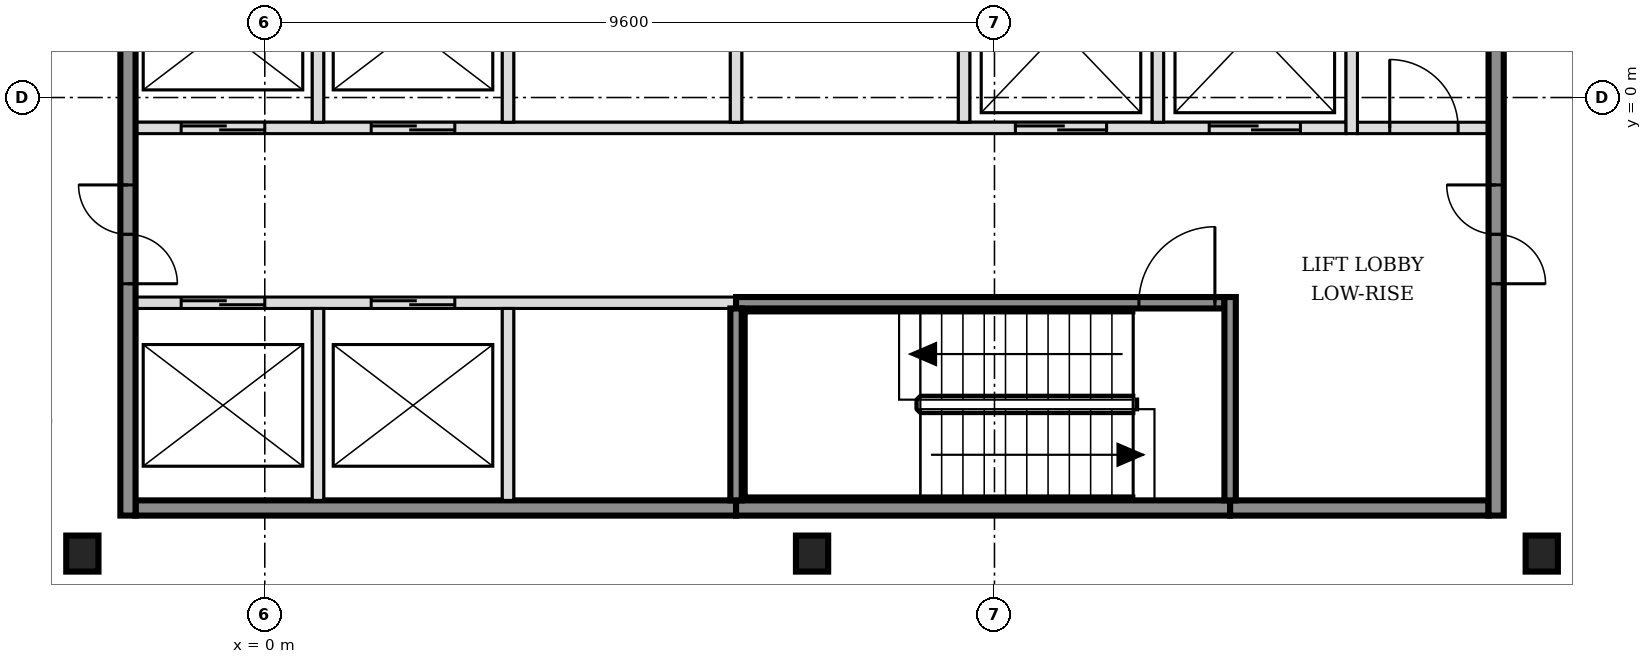
"""IFC4 building model, lengths in metres.
Left out: names, types, materials, properties, quantities, classifications, styles, units other than length and angle.
Written with IfcOpenShell. Run it as: python <this file> out.ifc"""

import sys

from ifc_helpers import new_model, si_unit, direction, frame, frame_2d, origin, origin_2d, place, context, subcontext, project, spatial, rectangle, i_section, extrude, element, fill, save


model = new_model("IFC4")
c1 = context("Model", 3, precision=1e-05, world=origin(), true_north=direction((0.0, 1.0)))
c2 = subcontext(c1, "Body", "Model", "MODEL_VIEW")
j1 = project(units=[si_unit("LENGTHUNIT", "METRE"), si_unit("PLANEANGLEUNIT", "RADIAN")], contexts=[c1])
p1 = place(None, origin())
s1 = spatial("IfcSite", under=j1, at=p1, CompositionType="ELEMENT")
p2 = place(p1, origin())
s2 = spatial("IfcBuilding", under=s1, at=p2, CompositionType="ELEMENT")
p3 = place(p2, frame((0.0, 0.0, 108.6)))
s3 = spatial("IfcBuildingStorey", under=s2, at=p3, CompositionType="ELEMENT", Elevation=108.6)
for number, where, z_axis, x_axis in (
    (1, (-2.4, -6.0, -0.15), (0.0, 0.0, 1.0), (1.0, 0.0, 0.0)),
    (2, (7.2, -6.0, -0.15), (0.0, 0.0, 1.0), (1.0, 0.0, 0.0)),
    (3, (16.8, -6.0, -0.15), (0.0, 0.0, 1.0), (1.0, 0.0, 0.0)),
):
    element("IfcColumn", number, at=place(p3, frame(where, z_axis=z_axis, x_axis=x_axis)), inside=s3, PredefinedType="COLUMN", context=c2, shape_type="SweptSolid", body=[
        extrude(i_section(OverallWidth=0.424, OverallDepth=0.474, WebThickness=0.048, FlangeThickness=0.077, FilletRadius=0.015, at=origin_2d()), origin(), (0.0, 0.0, 1.0), 3.6),
    ])
p4 = place(p3, frame((-1.7, -5.4, 0.0), z_axis=(0.0, 0.0, 1.0), x_axis=(1.0, 0.0, 0.0)))
e4 = element("IfcWall", 4, at=p4, inside=s3, PredefinedType="SOLIDWALL", context=c2, shape_type="SweptSolid", body=[
    extrude(rectangle(XDim=7.9, YDim=0.2, at=frame_2d((3.95, 0.0))), origin(), (0.0, 0.0, 1.0), 3.45),
])
p5 = place(p3, frame((6.2, -5.4, 0.0), z_axis=(0.0, 0.0, 1.0), x_axis=(1.0, 0.0, 0.0)))
e5 = element("IfcWall", 5, at=p5, inside=s3, PredefinedType="SOLIDWALL", context=c2, shape_type="SweptSolid", body=[
    extrude(rectangle(XDim=6.5, YDim=0.2, at=frame_2d((3.25, 0.0))), origin(), (0.0, 0.0, 1.0), 3.45),
])
p6 = place(p3, frame((12.7, -5.4, 0.0), z_axis=(0.0, 0.0, 1.0), x_axis=(1.0, 0.0, 0.0)))
e6 = element("IfcWall", 6, at=p6, inside=s3, PredefinedType="SOLIDWALL", context=c2, shape_type="SweptSolid", body=[
    extrude(rectangle(XDim=3.4, YDim=0.2, at=frame_2d((1.7, 0.0))), origin(), (0.0, 0.0, 1.0), 3.45),
])
p7 = place(p3, frame((-1.7, -2.7, 0.0), z_axis=(0.0, 0.0, 1.0), x_axis=(1.0, 0.0, 0.0)))
e7 = element("IfcWall", 7, at=p7, inside=s3, PredefinedType="SOLIDWALL", context=c2, shape_type="SweptSolid", body=[
    extrude(rectangle(XDim=7.9, YDim=0.15, at=frame_2d((3.95, 0.0))), origin(), (0.0, 0.0, 1.0), 3.45),
])
p8 = place(p7, frame((0.6, 0.0, 0.0)))
e8 = element("IfcOpeningElement", 8, at=p8, cuts=e7, PredefinedType="OPENING", context=c2, shape_type="SweptSolid", body=[
    extrude(rectangle(XDim=1.1, YDim=2.1, at=frame_2d((0.55, 1.05))), frame((0.0, 0.085, 0.0), z_axis=(0.0, -1.0, 0.0), x_axis=(1.0, 0.0, 0.0)), (0.0, 0.0, 1.0), 0.17),
])
p9 = place(p7, frame((3.1, 0.0, 0.0)))
e9 = element("IfcOpeningElement", 9, at=p9, cuts=e7, PredefinedType="OPENING", context=c2, shape_type="SweptSolid", body=[
    extrude(rectangle(XDim=1.1, YDim=2.1, at=frame_2d((0.55, 1.05))), frame((0.0, 0.085, 0.0), z_axis=(0.0, -1.0, 0.0), x_axis=(1.0, 0.0, 0.0)), (0.0, 0.0, 1.0), 0.17),
])
p10 = place(p3, frame((6.2, -2.7, 0.0), z_axis=(0.0, 0.0, 1.0), x_axis=(1.0, 0.0, 0.0)))
e10 = element("IfcWall", 10, at=p10, inside=s3, PredefinedType="SOLIDWALL", context=c2, shape_type="SweptSolid", body=[
    extrude(rectangle(XDim=6.425, YDim=0.15, at=frame_2d((3.212, 0.0))), origin(), (0.0, 0.0, 1.0), 3.45),
])
p11 = place(p10, frame((5.3, 0.0, 0.0)))
e11 = element("IfcOpeningElement", 11, at=p11, cuts=e10, PredefinedType="OPENING", context=c2, shape_type="SweptSolid", body=[
    extrude(rectangle(XDim=1.0, YDim=2.1, at=frame_2d((0.5, 1.05))), frame((0.0, 0.085, 0.0), z_axis=(0.0, -1.0, 0.0), x_axis=(1.0, 0.0, 0.0)), (0.0, 0.0, 1.0), 0.17),
])
p12 = place(p3, frame((-1.7, -0.4, 0.0), z_axis=(0.0, 0.0, 1.0), x_axis=(1.0, 0.0, 0.0)))
e12 = element("IfcWall", 12, at=p12, inside=s3, PredefinedType="SOLIDWALL", context=c2, shape_type="SweptSolid", body=[
    extrude(rectangle(XDim=15.925, YDim=0.15, at=frame_2d((7.962, 0.0))), origin(), (0.0, 0.0, 1.0), 3.45),
])
p13 = place(p12, frame((0.6, 0.0, 0.0)))
e13 = element("IfcOpeningElement", 13, at=p13, cuts=e12, PredefinedType="OPENING", context=c2, shape_type="SweptSolid", body=[
    extrude(rectangle(XDim=1.1, YDim=2.1, at=frame_2d((0.55, 1.05))), frame((0.0, 0.085, 0.0), z_axis=(0.0, -1.0, 0.0), x_axis=(1.0, 0.0, 0.0)), (0.0, 0.0, 1.0), 0.17),
])
p14 = place(p12, frame((3.1, 0.0, 0.0)))
e14 = element("IfcOpeningElement", 14, at=p14, cuts=e12, PredefinedType="OPENING", context=c2, shape_type="SweptSolid", body=[
    extrude(rectangle(XDim=1.1, YDim=2.1, at=frame_2d((0.55, 1.05))), frame((0.0, 0.085, 0.0), z_axis=(0.0, -1.0, 0.0), x_axis=(1.0, 0.0, 0.0)), (0.0, 0.0, 1.0), 0.17),
])
p15 = place(p12, frame((11.575, 0.0, 0.0)))
e15 = element("IfcOpeningElement", 15, at=p15, cuts=e12, PredefinedType="OPENING", context=c2, shape_type="SweptSolid", body=[
    extrude(rectangle(XDim=1.2, YDim=2.1, at=frame_2d((0.6, 1.05))), frame((0.0, 0.085, 0.0), z_axis=(0.0, -1.0, 0.0), x_axis=(1.0, 0.0, 0.0)), (0.0, 0.0, 1.0), 0.17),
])
p16 = place(p12, frame((14.125, 0.0, 0.0)))
e16 = element("IfcOpeningElement", 16, at=p16, cuts=e12, PredefinedType="OPENING", context=c2, shape_type="SweptSolid", body=[
    extrude(rectangle(XDim=1.2, YDim=2.1, at=frame_2d((0.6, 1.05))), frame((0.0, 0.085, 0.0), z_axis=(0.0, -1.0, 0.0), x_axis=(1.0, 0.0, 0.0)), (0.0, 0.0, 1.0), 0.17),
])
p17 = place(p3, frame((14.375, -0.4, 0.0), z_axis=(0.0, 0.0, 1.0), x_axis=(1.0, 0.0, 0.0)))
e17 = element("IfcWall", 17, at=p17, inside=s3, PredefinedType="PARTITIONING", context=c2, shape_type="SweptSolid", body=[
    extrude(rectangle(XDim=1.725, YDim=0.15, at=frame_2d((0.863, 0.0))), origin(), (0.0, 0.0, 1.0), 3.45),
])
p18 = place(p17, frame((0.425, 0.0, 0.0)))
e18 = element("IfcOpeningElement", 18, at=p18, cuts=e17, PredefinedType="OPENING", context=c2, shape_type="SweptSolid", body=[
    extrude(rectangle(XDim=0.9, YDim=2.1, at=frame_2d((0.45, 1.05))), frame((0.0, 0.085, 0.0), z_axis=(0.0, -1.0, 0.0), x_axis=(1.0, 0.0, 0.0)), (0.0, 0.0, 1.0), 0.17),
])
p19 = place(p3, frame((-1.8, -5.5, 0.0), z_axis=(0.0, 0.0, 1.0), x_axis=(0.0, 1.0, 0.0)))
e19 = element("IfcWall", 19, at=p19, inside=s3, PredefinedType="SOLIDWALL", context=c2, shape_type="SweptSolid", body=[
    extrude(rectangle(XDim=15.8, YDim=0.2, at=frame_2d((7.9, 0.0))), origin(), (0.0, 0.0, 1.0), 3.45),
])
p20 = place(p19, frame((3.05, 0.0, 0.0)))
e20 = element("IfcOpeningElement", 20, at=p20, cuts=e19, PredefinedType="OPENING", context=c2, shape_type="SweptSolid", body=[
    extrude(rectangle(XDim=1.3, YDim=2.1, at=frame_2d((0.65, 1.05))), frame((0.0, 0.11, 0.0), z_axis=(0.0, -1.0, 0.0), x_axis=(1.0, 0.0, 0.0)), (0.0, 0.0, 1.0), 0.22),
])
p21 = place(p19, frame((11.45, 0.0, 0.0)))
e21 = element("IfcOpeningElement", 21, at=p21, cuts=e19, PredefinedType="OPENING", context=c2, shape_type="SweptSolid", body=[
    extrude(rectangle(XDim=1.3, YDim=2.1, at=frame_2d((0.65, 1.05))), frame((0.0, 0.11, 0.0), z_axis=(0.0, -1.0, 0.0), x_axis=(1.0, 0.0, 0.0)), (0.0, 0.0, 1.0), 0.22),
])
p22 = place(p3, frame((0.7, -5.3, 0.0), z_axis=(0.0, 0.0, 1.0), x_axis=(0.0, 1.0, 0.0)))
e22 = element("IfcWall", 22, at=p22, inside=s3, PredefinedType="SOLIDWALL", context=c2, shape_type="SweptSolid", body=[
    extrude(rectangle(XDim=2.525, YDim=0.15, at=frame_2d((1.263, 0.0))), origin(), (0.0, 0.0, 1.0), 3.45),
])
p23 = place(p3, frame((0.7, -0.325, 0.0), z_axis=(0.0, 0.0, 1.0), x_axis=(0.0, 1.0, 0.0)))
e23 = element("IfcWall", 23, at=p23, inside=s3, PredefinedType="SOLIDWALL", context=c2, shape_type="SweptSolid", body=[
    extrude(rectangle(XDim=2.45, YDim=0.15, at=frame_2d((1.225, 0.0))), origin(), (0.0, 0.0, 1.0), 3.45),
])
p24 = place(p3, frame((3.2, -5.3, 0.0), z_axis=(0.0, 0.0, 1.0), x_axis=(0.0, 1.0, 0.0)))
e24 = element("IfcWall", 24, at=p24, inside=s3, PredefinedType="SOLIDWALL", context=c2, shape_type="SweptSolid", body=[
    extrude(rectangle(XDim=2.525, YDim=0.15, at=frame_2d((1.263, 0.0))), origin(), (0.0, 0.0, 1.0), 3.45),
])
p25 = place(p3, frame((3.2, -0.325, 0.0), z_axis=(0.0, 0.0, 1.0), x_axis=(0.0, 1.0, 0.0)))
e25 = element("IfcWall", 25, at=p25, inside=s3, PredefinedType="SOLIDWALL", context=c2, shape_type="SweptSolid", body=[
    extrude(rectangle(XDim=2.45, YDim=0.15, at=frame_2d((1.225, 0.0))), origin(), (0.0, 0.0, 1.0), 3.45),
])
p26 = place(p3, frame((6.2, -5.3, 0.0), z_axis=(0.0, 0.0, 1.0), x_axis=(0.0, 1.0, 0.0)))
e26 = element("IfcWall", 26, at=p26, inside=s3, PredefinedType="SOLIDWALL", context=c2, shape_type="SweptSolid", body=[
    extrude(rectangle(XDim=2.525, YDim=0.15, at=frame_2d((1.263, 0.0))), origin(), (0.0, 0.0, 1.0), 3.45),
])
for number, where, z_axis, x_axis in (
    (27, (6.2, -0.325, 0.0), (0.0, 0.0, 1.0), (0.0, 1.0, 0.0)),
    (28, (9.2, -0.325, 0.0), (0.0, 0.0, 1.0), (0.0, 1.0, 0.0)),
    (29, (11.75, -0.325, 0.0), (0.0, 0.0, 1.0), (0.0, 1.0, 0.0)),
):
    element("IfcWall", number, at=place(p3, frame(where, z_axis=z_axis, x_axis=x_axis)), inside=s3, PredefinedType="SOLIDWALL", context=c2, shape_type="SweptSolid", body=[
        extrude(rectangle(XDim=2.45, YDim=0.15, at=frame_2d((1.225, 0.0))), origin(), (0.0, 0.0, 1.0), 3.45),
    ])
p27 = place(p3, frame((12.7, -5.3, 0.0), z_axis=(0.0, 0.0, 1.0), x_axis=(0.0, 1.0, 0.0)))
e30 = element("IfcWall", 30, at=p27, inside=s3, PredefinedType="SOLIDWALL", context=c2, shape_type="SweptSolid", body=[
    extrude(rectangle(XDim=2.675, YDim=0.15, at=frame_2d((1.337, 0.0))), origin(), (0.0, 0.0, 1.0), 3.45),
])
p28 = place(p3, frame((14.3, -0.475, 0.0), z_axis=(0.0, 0.0, 1.0), x_axis=(0.0, 1.0, 0.0)))
e31 = element("IfcWall", 31, at=p28, inside=s3, PredefinedType="SOLIDWALL", context=c2, shape_type="SweptSolid", body=[
    extrude(rectangle(XDim=2.75, YDim=0.15, at=frame_2d((1.375, 0.0))), origin(), (0.0, 0.0, 1.0), 3.45),
])
p29 = place(p3, frame((16.2, -5.5, 0.0), z_axis=(0.0, 0.0, 1.0), x_axis=(0.0, 1.0, 0.0)))
e32 = element("IfcWall", 32, at=p29, inside=s3, PredefinedType="SOLIDWALL", context=c2, shape_type="SweptSolid", body=[
    extrude(rectangle(XDim=15.8, YDim=0.2, at=frame_2d((7.9, 0.0))), origin(), (0.0, 0.0, 1.0), 3.45),
])
p30 = place(p29, frame((3.05, 0.0, 0.0)))
e33 = element("IfcOpeningElement", 33, at=p30, cuts=e32, PredefinedType="OPENING", context=c2, shape_type="SweptSolid", body=[
    extrude(rectangle(XDim=1.3, YDim=2.1, at=frame_2d((0.65, 1.05))), frame((0.0, 0.11, 0.0), z_axis=(0.0, -1.0, 0.0), x_axis=(1.0, 0.0, 0.0)), (0.0, 0.0, 1.0), 0.22),
])
p31 = place(p29, frame((11.45, 0.0, 0.0)))
e34 = element("IfcOpeningElement", 34, at=p31, cuts=e32, PredefinedType="OPENING", context=c2, shape_type="SweptSolid", body=[
    extrude(rectangle(XDim=1.3, YDim=2.1, at=frame_2d((0.65, 1.05))), frame((0.0, 0.11, 0.0), z_axis=(0.0, -1.0, 0.0), x_axis=(1.0, 0.0, 0.0)), (0.0, 0.0, 1.0), 0.22),
])
p32 = place(p8, origin())
e35 = element("IfcDoor", 35, at=p32, inside=s3, OperationType="DOUBLE_DOOR_SLIDING", PredefinedType="DOOR", context=c2, shape_type="SweptSolid", body=[
    extrude(rectangle(XDim=1.1, YDim=2.1, at=frame_2d((0.55, 1.05))), frame((0.0, 0.025, 0.0), z_axis=(0.0, -1.0, 0.0), x_axis=(1.0, 0.0, 0.0)), (0.0, 0.0, 1.0), 0.05),
])
fill(e8, e35)
p33 = place(p9, origin())
e36 = element("IfcDoor", 36, at=p33, inside=s3, OperationType="DOUBLE_DOOR_SLIDING", PredefinedType="DOOR", context=c2, shape_type="SweptSolid", body=[
    extrude(rectangle(XDim=1.1, YDim=2.1, at=frame_2d((0.55, 1.05))), frame((0.0, 0.025, 0.0), z_axis=(0.0, -1.0, 0.0), x_axis=(1.0, 0.0, 0.0)), (0.0, 0.0, 1.0), 0.05),
])
fill(e9, e36)
p34 = place(p13, origin())
e37 = element("IfcDoor", 37, at=p34, inside=s3, OperationType="DOUBLE_DOOR_SLIDING", PredefinedType="DOOR", context=c2, shape_type="SweptSolid", body=[
    extrude(rectangle(XDim=1.1, YDim=2.1, at=frame_2d((0.55, 1.05))), frame((0.0, 0.025, 0.0), z_axis=(0.0, -1.0, 0.0), x_axis=(1.0, 0.0, 0.0)), (0.0, 0.0, 1.0), 0.05),
])
fill(e13, e37)
p35 = place(p14, origin())
e38 = element("IfcDoor", 38, at=p35, inside=s3, OperationType="DOUBLE_DOOR_SLIDING", PredefinedType="DOOR", context=c2, shape_type="SweptSolid", body=[
    extrude(rectangle(XDim=1.1, YDim=2.1, at=frame_2d((0.55, 1.05))), frame((0.0, 0.025, 0.0), z_axis=(0.0, -1.0, 0.0), x_axis=(1.0, 0.0, 0.0)), (0.0, 0.0, 1.0), 0.05),
])
fill(e14, e38)
p36 = place(p15, origin())
e39 = element("IfcDoor", 39, at=p36, inside=s3, OperationType="DOUBLE_DOOR_SLIDING", PredefinedType="DOOR", context=c2, shape_type="SweptSolid", body=[
    extrude(rectangle(XDim=1.2, YDim=2.1, at=frame_2d((0.6, 1.05))), frame((0.0, 0.025, 0.0), z_axis=(0.0, -1.0, 0.0), x_axis=(1.0, 0.0, 0.0)), (0.0, 0.0, 1.0), 0.05),
])
fill(e15, e39)
p37 = place(p16, origin())
e40 = element("IfcDoor", 40, at=p37, inside=s3, OperationType="DOUBLE_DOOR_SLIDING", PredefinedType="DOOR", context=c2, shape_type="SweptSolid", body=[
    extrude(rectangle(XDim=1.2, YDim=2.1, at=frame_2d((0.6, 1.05))), frame((0.0, 0.025, 0.0), z_axis=(0.0, -1.0, 0.0), x_axis=(1.0, 0.0, 0.0)), (0.0, 0.0, 1.0), 0.05),
])
fill(e16, e40)
p38 = place(p11, origin())
e41 = element("IfcDoor", 41, at=p38, inside=s3, OperationType="SINGLE_SWING_RIGHT", PredefinedType="DOOR", context=c2, shape_type="SweptSolid", body=[
    extrude(rectangle(XDim=1.0, YDim=2.1, at=frame_2d((0.5, 1.05))), frame((0.0, 0.025, 0.0), z_axis=(0.0, -1.0, 0.0), x_axis=(1.0, 0.0, 0.0)), (0.0, 0.0, 1.0), 0.05),
])
fill(e11, e41)
p39 = place(p20, origin())
e42 = element("IfcDoor", 42, at=p39, inside=s3, OperationType="DOUBLE_DOOR_SINGLE_SWING", PredefinedType="DOOR", context=c2, shape_type="SweptSolid", body=[
    extrude(rectangle(XDim=1.3, YDim=2.1, at=frame_2d((0.65, 1.05))), frame((0.0, 0.025, 0.0), z_axis=(0.0, -1.0, 0.0), x_axis=(1.0, 0.0, 0.0)), (0.0, 0.0, 1.0), 0.05),
])
fill(e20, e42)
p40 = place(p30, origin())
e43 = element("IfcDoor", 43, at=p40, inside=s3, OperationType="DOUBLE_DOOR_SINGLE_SWING", PredefinedType="DOOR", context=c2, shape_type="SweptSolid", body=[
    extrude(rectangle(XDim=1.3, YDim=2.1, at=frame_2d((0.65, 1.05))), frame((0.0, 0.025, 0.0), z_axis=(0.0, -1.0, 0.0), x_axis=(1.0, 0.0, 0.0)), (0.0, 0.0, 1.0), 0.05),
])
fill(e33, e43)
p41 = place(p18, origin())
e44 = element("IfcDoor", 44, at=p41, inside=s3, OperationType="SINGLE_SWING_LEFT", PredefinedType="DOOR", context=c2, shape_type="SweptSolid", body=[
    extrude(rectangle(XDim=0.9, YDim=2.1, at=frame_2d((0.45, 1.05))), frame((0.0, 0.025, 0.0), z_axis=(0.0, -1.0, 0.0), x_axis=(1.0, 0.0, 0.0)), (0.0, 0.0, 1.0), 0.05),
])
fill(e18, e44)
save(model, sys.argv[1])
